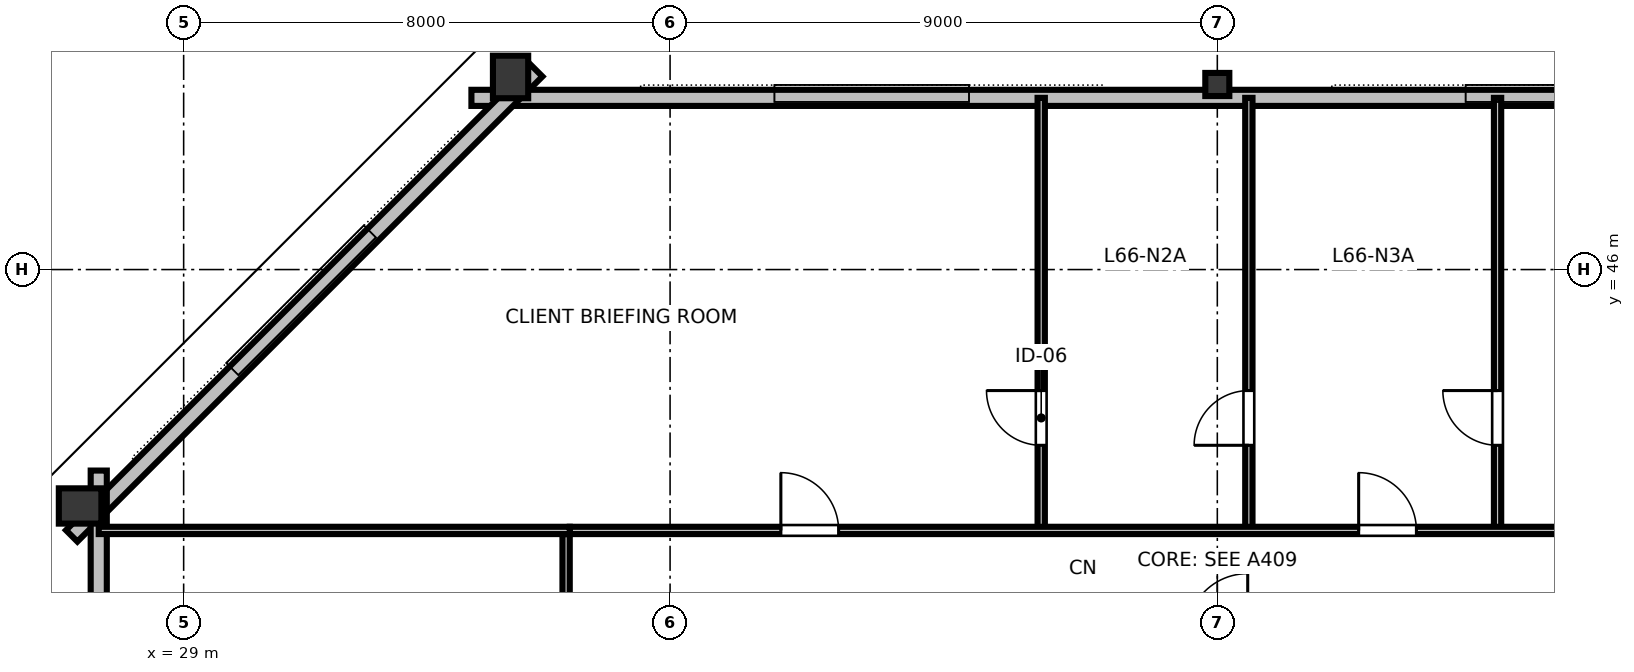
"""IFC4 building model, lengths in metres.
Left out: names, types, materials, properties, quantities, classifications, styles, units other than length and angle.
Written with IfcOpenShell. Run it as: python <this file> out.ifc"""

import sys

from ifc_helpers import new_model, si_unit, direction, frame, frame_2d, origin, origin_2d, place, context, subcontext, project, spatial, rectangle, hollow_rectangle, i_section, extrude, element, fill, save


model = new_model("IFC4")
c1 = context("Model", 3, precision=1e-05, world=origin(), true_north=direction((0.0, 1.0)))
c2 = subcontext(c1, "Body", "Model", "MODEL_VIEW")
j1 = project(units=[si_unit("LENGTHUNIT", "METRE"), si_unit("PLANEANGLEUNIT", "RADIAN")], contexts=[c1])
p1 = place(None, origin())
s1 = spatial("IfcSite", under=j1, at=p1, CompositionType="ELEMENT")
p2 = place(p1, origin())
s2 = spatial("IfcBuilding", under=s1, at=p2, CompositionType="ELEMENT")
p3 = place(p2, frame((0.0, 0.0, 250.2)))
s3 = spatial("IfcBuildingStorey", under=s2, at=p3, CompositionType="ELEMENT", Elevation=250.2)
p4 = place(p3, frame((46.0, 49.044, 0.0), z_axis=(0.0, 0.0, 1.0), x_axis=(1.0, 0.0, 0.0)))
e1 = element("IfcColumn", 1, at=p4, inside=s3, PredefinedType="COLUMN", context=c2, shape_type="SweptSolid", body=[
    extrude(i_section(OverallWidth=0.395, OverallDepth=0.38, WebThickness=0.019, FlangeThickness=0.03, FilletRadius=0.025, at=origin_2d()), origin(), (0.0, 0.0, 1.0), 3.373),
])
for number, where, z_axis, x_axis in (
    (2, (34.376, 49.167, 0.0), (0.0, 0.0, 1.0), (1.0, 0.0, 0.0)),
    (3, (27.297, 42.112, 0.0), (0.0, 0.0, 1.0), (0.0, 1.0, 0.0)),
):
    element("IfcColumn", number, at=place(p3, frame(where, z_axis=z_axis, x_axis=x_axis)), inside=s3, PredefinedType="COLUMN", context=c2, shape_type="SweptSolid", body=[
        extrude(hollow_rectangle(XDim=0.58, YDim=0.7, WallThickness=0.032, at=origin_2d()), origin(), (0.0, 0.0, 1.0), 3.373),
    ])
p5 = place(p3, frame((58.267, 48.823, 0.0), z_axis=(0.0, 0.0, 1.0), x_axis=(-1.0, 0.0, 0.0)))
e4 = element("IfcWall", 4, at=p5, inside=s3, PredefinedType="STANDARD", context=c2, shape_type="SweptSolid", body=[
    extrude(rectangle(XDim=24.535, YDim=0.265, at=frame_2d((12.267, 0.0))), origin(), (0.0, 0.0, 1.0), 2.832),
])
p6 = place(p3, frame((34.807, 49.269, 0.0), z_axis=(0.0, 0.0, 1.0), x_axis=(-0.707106781187, -0.707106781187, 0.0)))
e5 = element("IfcWall", 5, at=p6, inside=s3, PredefinedType="STANDARD", context=c2, shape_type="SweptSolid", body=[
    extrude(rectangle(XDim=10.816, YDim=0.265, at=frame_2d((5.408, 0.0))), origin(), (0.0, 0.0, 1.0), 2.832),
])
p7 = place(p3, frame((27.604, 42.695, 0.0), z_axis=(0.0, 0.0, 1.0), x_axis=(0.0, -1.0, 0.0)))
e6 = element("IfcWall", 6, at=p7, inside=s3, PredefinedType="STANDARD", context=c2, shape_type="SweptSolid", body=[
    extrude(rectangle(XDim=21.389, YDim=0.265, at=frame_2d((10.695, 0.0))), origin(), (0.0, 0.0, 1.0), 2.832),
])
p8 = place(p3, frame((43.104, 41.71, 0.0), z_axis=(0.0, 0.0, 1.0), x_axis=(0.0, 1.0, 0.0)))
e7 = element("IfcWall", 7, at=p8, inside=s3, PredefinedType="PARTITIONING", context=c2, shape_type="SweptSolid", body=[
    extrude(rectangle(XDim=7.114, YDim=0.12, at=frame_2d((3.557, 0.0))), origin(), (0.0, 0.0, 1.0), 2.655),
])
p9 = place(p8, frame((1.4, 0.0, 0.0)))
e8 = element("IfcOpeningElement", 8, at=p9, cuts=e7, PredefinedType="OPENING", context=c2, shape_type="SweptSolid", body=[
    extrude(rectangle(XDim=0.9, YDim=2.15, at=frame_2d((0.45, 1.075))), frame((0.0, 0.07, 0.0), z_axis=(0.0, -1.0, 0.0), x_axis=(1.0, 0.0, 0.0)), (0.0, 0.0, 1.0), 0.14),
])
p10 = place(p3, frame((46.519, 41.71, 0.0), z_axis=(0.0, 0.0, 1.0), x_axis=(0.0, 1.0, 0.0)))
e9 = element("IfcWall", 9, at=p10, inside=s3, PredefinedType="PARTITIONING", context=c2, shape_type="SweptSolid", body=[
    extrude(rectangle(XDim=7.114, YDim=0.12, at=frame_2d((3.557, 0.0))), origin(), (0.0, 0.0, 1.0), 2.655),
])
p11 = place(p10, frame((1.4, 0.0, 0.0)))
e10 = element("IfcOpeningElement", 10, at=p11, cuts=e9, PredefinedType="OPENING", context=c2, shape_type="SweptSolid", body=[
    extrude(rectangle(XDim=0.9, YDim=2.15, at=frame_2d((0.45, 1.075))), frame((0.0, 0.07, 0.0), z_axis=(0.0, -1.0, 0.0), x_axis=(1.0, 0.0, 0.0)), (0.0, 0.0, 1.0), 0.14),
])
p12 = place(p3, frame((50.609, 41.71, 0.0), z_axis=(0.0, 0.0, 1.0), x_axis=(0.0, 1.0, 0.0)))
e11 = element("IfcWall", 11, at=p12, inside=s3, PredefinedType="PARTITIONING", context=c2, shape_type="SweptSolid", body=[
    extrude(rectangle(XDim=7.114, YDim=0.12, at=frame_2d((3.557, 0.0))), origin(), (0.0, 0.0, 1.0), 2.655),
])
p13 = place(p12, frame((1.4, 0.0, 0.0)))
e12 = element("IfcOpeningElement", 12, at=p13, cuts=e11, PredefinedType="OPENING", context=c2, shape_type="SweptSolid", body=[
    extrude(rectangle(XDim=0.9, YDim=2.15, at=frame_2d((0.45, 1.075))), frame((0.0, 0.07, 0.0), z_axis=(0.0, -1.0, 0.0), x_axis=(1.0, 0.0, 0.0)), (0.0, 0.0, 1.0), 0.14),
])
p14 = place(p3, frame((35.35, 41.71, 0.0), z_axis=(0.0, 0.0, 1.0), x_axis=(1.0, 0.0, 0.0)))
e13 = element("IfcWall", 13, at=p14, inside=s3, PredefinedType="PARTITIONING", context=c2, shape_type="SweptSolid", body=[
    extrude(rectangle(XDim=21.3, YDim=0.12, at=frame_2d((10.65, 0.0))), origin(), (0.0, 0.0, 1.0), 2.655),
])
p15 = place(p14, frame((3.472, 0.0, 0.0)))
e14 = element("IfcOpeningElement", 14, at=p15, cuts=e13, PredefinedType="OPENING", context=c2, shape_type="SweptSolid", body=[
    extrude(rectangle(XDim=0.95, YDim=2.15, at=frame_2d((0.475, 1.075))), frame((0.0, 0.07, 0.0), z_axis=(0.0, -1.0, 0.0), x_axis=(1.0, 0.0, 0.0)), (0.0, 0.0, 1.0), 0.14),
])
p16 = place(p14, frame((12.975, 0.0, 0.0)))
e15 = element("IfcOpeningElement", 15, at=p16, cuts=e13, PredefinedType="OPENING", context=c2, shape_type="SweptSolid", body=[
    extrude(rectangle(XDim=0.95, YDim=2.15, at=frame_2d((0.475, 1.075))), frame((0.0, 0.07, 0.0), z_axis=(0.0, -1.0, 0.0), x_axis=(1.0, 0.0, 0.0)), (0.0, 0.0, 1.0), 0.14),
])
p17 = place(p14, frame((17.735, 0.0, 0.0)))
e16 = element("IfcOpeningElement", 16, at=p17, cuts=e13, PredefinedType="OPENING", context=c2, shape_type="SweptSolid", body=[
    extrude(rectangle(XDim=0.95, YDim=2.15, at=frame_2d((0.475, 1.075))), frame((0.0, 0.07, 0.0), z_axis=(0.0, -1.0, 0.0), x_axis=(1.0, 0.0, 0.0)), (0.0, 0.0, 1.0), 0.14),
])
p18 = place(p3, frame((35.29, 22.35, 0.0), z_axis=(0.0, 0.0, 1.0), x_axis=(0.0, 1.0, 0.0)))
e17 = element("IfcWall", 17, at=p18, inside=s3, PredefinedType="PARTITIONING", context=c2, shape_type="SweptSolid", body=[
    extrude(rectangle(XDim=19.3, YDim=0.12, at=frame_2d((9.65, 0.0))), origin(), (0.0, 0.0, 1.0), 2.655),
])
p19 = place(p18, frame((3.656, 0.0, 0.0)))
e18 = element("IfcOpeningElement", 18, at=p19, cuts=e17, PredefinedType="OPENING", context=c2, shape_type="SweptSolid", body=[
    extrude(rectangle(XDim=0.95, YDim=2.15, at=frame_2d((0.475, 1.075))), frame((0.0, 0.07, 0.0), z_axis=(0.0, -1.0, 0.0), x_axis=(1.0, 0.0, 0.0)), (0.0, 0.0, 1.0), 0.14),
])
p20 = place(p18, frame((13.106, 0.0, 0.0)))
e19 = element("IfcOpeningElement", 19, at=p20, cuts=e17, PredefinedType="OPENING", context=c2, shape_type="SweptSolid", body=[
    extrude(rectangle(XDim=0.95, YDim=2.15, at=frame_2d((0.475, 1.075))), frame((0.0, 0.07, 0.0), z_axis=(0.0, -1.0, 0.0), x_axis=(1.0, 0.0, 0.0)), (0.0, 0.0, 1.0), 0.14),
])
p21 = place(p3, frame((35.35, 41.71, 0.0), z_axis=(0.0, 0.0, 1.0), x_axis=(-1.0, 0.0, 0.0)))
e20 = element("IfcWall", 20, at=p21, inside=s3, PredefinedType="PARTITIONING", context=c2, shape_type="SweptSolid", body=[
    extrude(rectangle(XDim=7.747, YDim=0.12, at=frame_2d((3.873, 0.0))), origin(), (0.0, 0.0, 1.0), 2.655),
])
p22 = place(p9, origin())
e21 = element("IfcDoor", 21, at=p22, inside=s3, OperationType="SINGLE_SWING_RIGHT", PredefinedType="DOOR", context=c2, shape_type="SweptSolid", body=[
    extrude(rectangle(XDim=0.9, YDim=2.15, at=frame_2d((0.45, 1.075))), frame((0.0, 0.025, 0.0), z_axis=(0.0, -1.0, 0.0), x_axis=(1.0, 0.0, 0.0)), (0.0, 0.0, 1.0), 0.05),
])
fill(e8, e21)
p23 = place(p11, origin())
e22 = element("IfcDoor", 22, at=p23, inside=s3, OperationType="SINGLE_SWING_LEFT", PredefinedType="DOOR", context=c2, shape_type="SweptSolid", body=[
    extrude(rectangle(XDim=0.9, YDim=2.15, at=frame_2d((0.45, 1.075))), frame((0.0, 0.025, 0.0), z_axis=(0.0, -1.0, 0.0), x_axis=(1.0, 0.0, 0.0)), (0.0, 0.0, 1.0), 0.05),
])
fill(e10, e22)
p24 = place(p13, origin())
e23 = element("IfcDoor", 23, at=p24, inside=s3, OperationType="SINGLE_SWING_RIGHT", PredefinedType="DOOR", context=c2, shape_type="SweptSolid", body=[
    extrude(rectangle(XDim=0.9, YDim=2.15, at=frame_2d((0.45, 1.075))), frame((0.0, 0.025, 0.0), z_axis=(0.0, -1.0, 0.0), x_axis=(1.0, 0.0, 0.0)), (0.0, 0.0, 1.0), 0.05),
])
fill(e12, e23)
p25 = place(p15, origin())
e24 = element("IfcDoor", 24, at=p25, inside=s3, OperationType="SINGLE_SWING_LEFT", PredefinedType="DOOR", context=c2, shape_type="SweptSolid", body=[
    extrude(rectangle(XDim=0.95, YDim=2.15, at=frame_2d((0.475, 1.075))), frame((0.0, 0.025, 0.0), z_axis=(0.0, -1.0, 0.0), x_axis=(1.0, 0.0, 0.0)), (0.0, 0.0, 1.0), 0.05),
])
fill(e14, e24)
p26 = place(p16, origin())
e25 = element("IfcDoor", 25, at=p26, inside=s3, OperationType="SINGLE_SWING_LEFT", PredefinedType="DOOR", context=c2, shape_type="SweptSolid", body=[
    extrude(rectangle(XDim=0.95, YDim=2.15, at=frame_2d((0.475, 1.075))), frame((0.0, 0.025, 0.0), z_axis=(0.0, -1.0, 0.0), x_axis=(1.0, 0.0, 0.0)), (0.0, 0.0, 1.0), 0.05),
])
fill(e15, e25)
save(model, sys.argv[1])
